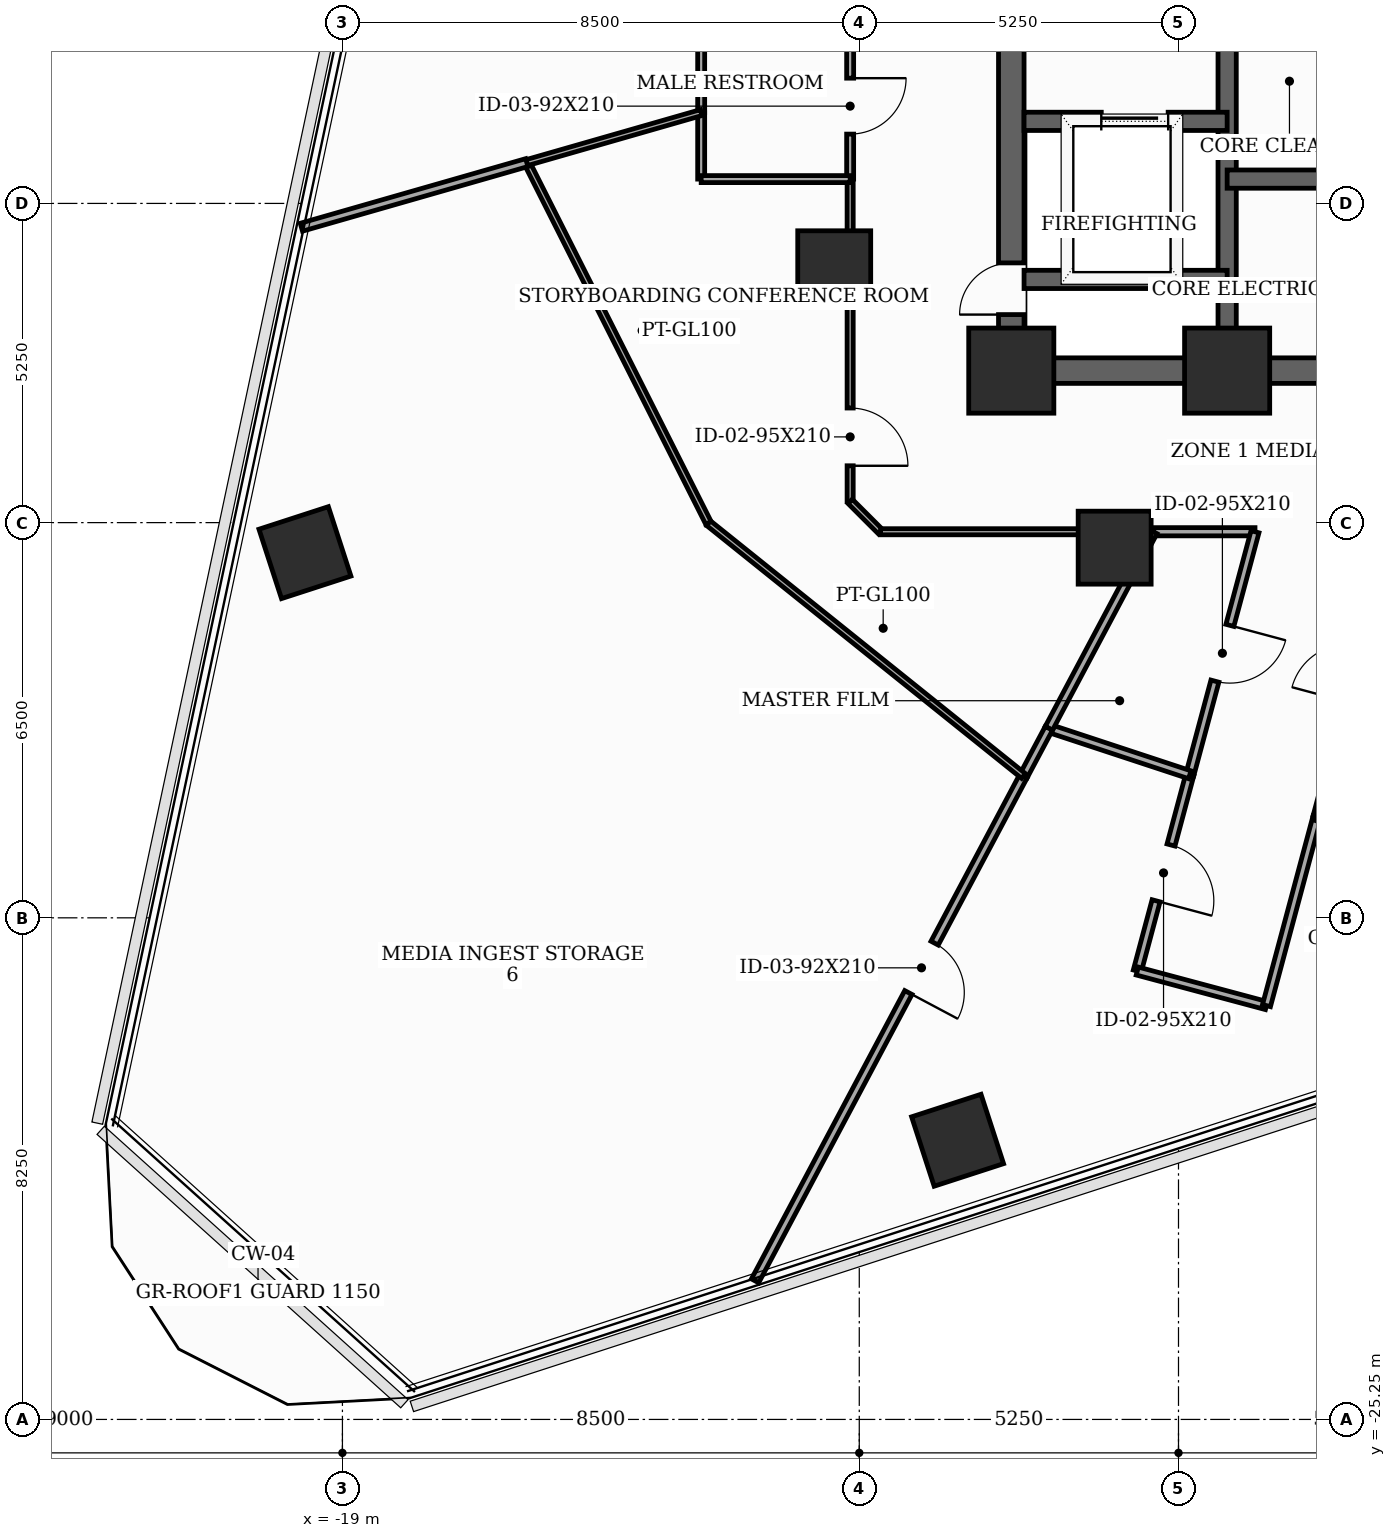
"""IFC4 building model, lengths in metres.
Left out: names, types, materials, properties, quantities, classifications, styles, units other than length and angle.
Written with IfcOpenShell. Run it as: python <this file> out.ifc"""

import sys

from ifc_helpers import new_model, si_unit, direction, frame, frame_2d, origin, origin_2d, place, context, subcontext, project, spatial, rectangle, extrude, element, fill, save


model = new_model("IFC4")
c1 = context("Model", 3, precision=1e-05, world=origin(), true_north=direction((0.0, 1.0)))
c2 = subcontext(c1, "Body", "Model", "MODEL_VIEW")
j1 = project(units=[si_unit("LENGTHUNIT", "METRE"), si_unit("PLANEANGLEUNIT", "RADIAN")], contexts=[c1])
p1 = place(None, origin())
s1 = spatial("IfcSite", under=j1, at=p1, CompositionType="ELEMENT")
p2 = place(p1, origin())
s2 = spatial("IfcBuilding", under=s1, at=p2, CompositionType="ELEMENT")
p3 = place(p2, frame((0.0, 0.0, 90.3)))
s3 = spatial("IfcBuildingStorey", under=s2, at=p3, CompositionType="ELEMENT", Elevation=90.3)
for number, where, z_axis, x_axis in (
    (1, (-8.0, -8.0, 0.0), (0.0, 0.0, 1.0), (1.0, 0.0, 0.0)),
    (2, (-4.45, -8.0, 0.0), (0.0, 0.0, 1.0), (1.0, 0.0, 0.0)),
):
    element("IfcColumn", number, at=place(p3, frame(where, z_axis=z_axis, x_axis=x_axis)), inside=s3, PredefinedType="COLUMN", context=c2, shape_type="SweptSolid", body=[
        extrude(rectangle(XDim=1.4, YDim=1.4, at=origin_2d()), origin(), (0.0, 0.0, 1.0), 3.7),
    ])
for number, where, z_axis, x_axis in (
    (3, (-10.912, -6.3, 0.0), (0.0, 0.0, 1.0), (1.0, 0.0, 0.0)),
    (4, (-6.3, -10.912, 0.0), (0.0, 0.0, 1.0), (1.0, 0.0, 0.0)),
    (5, (-8.883, -20.658, 0.0), (0.0, 0.0, 1.0), (0.951, 0.309, 0.0)),
    (6, (-19.616, -10.994, 0.0), (0.0, 0.0, 1.0), (0.951, 0.309, 0.0)),
):
    element("IfcColumn", number, at=place(p3, frame(where, z_axis=z_axis, x_axis=x_axis)), inside=s3, PredefinedType="COLUMN", context=c2, shape_type="SweptSolid", body=[
        extrude(rectangle(XDim=1.2, YDim=1.2, at=origin_2d()), origin(), (0.0, 0.0, 1.0), 3.7),
    ])
p4 = place(p3, frame((-8.0, -8.0, 0.0), z_axis=(0.0, 0.0, 1.0), x_axis=(0.0, 1.0, 0.0)))
e7 = element("IfcWall", 7, at=p4, inside=s3, PredefinedType="SHEAR", context=c2, shape_type="SweptSolid", body=[
    extrude(rectangle(XDim=16.0, YDim=0.42, at=frame_2d((8.0, 0.0))), origin(), (0.0, 0.0, 1.0), 3.5),
])
p5 = place(p4, frame((0.922, 0.0, 0.0)))
e8 = element("IfcOpeningElement", 8, at=p5, cuts=e7, PredefinedType="OPENING", context=c2, shape_type="SweptSolid", body=[
    extrude(rectangle(XDim=0.85, YDim=2.02, at=frame_2d((0.425, 1.01))), frame((0.0, 0.22, 0.0), z_axis=(0.0, -1.0, 0.0), x_axis=(1.0, 0.0, 0.0)), (0.0, 0.0, 1.0), 0.44),
])
p6 = place(p4, frame((5.35, 0.0, 0.0)))
e9 = element("IfcOpeningElement", 9, at=p6, cuts=e7, PredefinedType="OPENING", context=c2, shape_type="SweptSolid", body=[
    extrude(rectangle(XDim=1.05, YDim=2.15, at=frame_2d((0.525, 1.075))), frame((0.0, 0.22, 0.0), z_axis=(0.0, -1.0, 0.0), x_axis=(1.0, 0.0, 0.0)), (0.0, 0.0, 1.0), 0.44),
])
p7 = place(p3, frame((-8.0, -8.0, 0.0), z_axis=(0.0, 0.0, 1.0), x_axis=(1.0, 0.0, 0.0)))
e10 = element("IfcWall", 10, at=p7, inside=s3, PredefinedType="SHEAR", context=c2, shape_type="SweptSolid", body=[
    extrude(rectangle(XDim=16.0, YDim=0.42, at=frame_2d((8.0, 0.0))), origin(), (0.0, 0.0, 1.0), 3.5),
])
p8 = place(p7, frame((7.52, 0.0, 0.0)))
e11 = element("IfcOpeningElement", 11, at=p8, cuts=e10, PredefinedType="OPENING", context=c2, shape_type="SweptSolid", body=[
    extrude(rectangle(XDim=0.95, YDim=2.1, at=frame_2d((0.475, 1.05))), frame((0.0, 0.22, 0.0), z_axis=(0.0, -1.0, 0.0), x_axis=(1.0, 0.0, 0.0)), (0.0, 0.0, 1.0), 0.44),
])
p9 = place(p3, frame((-4.45, -7.79, 0.0), z_axis=(0.0, 0.0, 1.0), x_axis=(0.0, 1.0, 0.0)))
e12 = element("IfcWall", 12, at=p9, inside=s3, PredefinedType="SHEAR", context=c2, shape_type="SweptSolid", body=[
    extrude(rectangle(XDim=15.58, YDim=0.3, at=frame_2d((7.79, 0.0))), origin(), (0.0, 0.0, 1.0), 3.5),
])
p10 = place(p3, frame((-7.79, -3.9, 0.0), z_axis=(0.0, 0.0, 1.0), x_axis=(1.0, 0.0, 0.0)))
e13 = element("IfcWall", 13, at=p10, inside=s3, PredefinedType="SHEAR", context=c2, shape_type="SweptSolid", body=[
    extrude(rectangle(XDim=3.34, YDim=0.3, at=frame_2d((1.67, 0.0))), origin(), (0.0, 0.0, 1.0), 3.5),
])
p11 = place(p10, frame((1.27, 0.0, 0.0)))
e14 = element("IfcOpeningElement", 14, at=p11, cuts=e13, PredefinedType="OPENING", context=c2, shape_type="SweptSolid", body=[
    extrude(rectangle(XDim=1.1, YDim=2.1, at=frame_2d((0.55, 1.05))), frame((0.0, 0.16, 0.0), z_axis=(0.0, -1.0, 0.0), x_axis=(1.0, 0.0, 0.0)), (0.0, 0.0, 1.0), 0.32),
])
p12 = place(p3, frame((-7.79, -6.5, 0.0), z_axis=(0.0, 0.0, 1.0), x_axis=(1.0, 0.0, 0.0)))
e15 = element("IfcWall", 15, at=p12, inside=s3, PredefinedType="SHEAR", context=c2, shape_type="SweptSolid", body=[
    extrude(rectangle(XDim=3.34, YDim=0.3, at=frame_2d((1.67, 0.0))), origin(), (0.0, 0.0, 1.0), 3.5),
])
p13 = place(p3, frame((-4.45, -4.85, 0.0), z_axis=(0.0, 0.0, 1.0), x_axis=(1.0, 0.0, 0.0)))
e16 = element("IfcWall", 16, at=p13, inside=s3, PredefinedType="SHEAR", context=c2, shape_type="SweptSolid", body=[
    extrude(rectangle(XDim=8.9, YDim=0.3, at=frame_2d((4.45, 0.0))), origin(), (0.0, 0.0, 1.0), 3.5),
])
p14 = place(p3, frame((-5.663, -10.65, 0.0), z_axis=(0.0, 0.0, 1.0), x_axis=(1.0, 0.0, 0.0)))
e17 = element("IfcWall", 17, at=p14, inside=s3, PredefinedType="PARTITIONING", context=c2, shape_type="SweptSolid", body=[
    extrude(rectangle(XDim=1.671, YDim=0.135, at=frame_2d((0.835, 0.0))), origin(), (0.0, 0.0, 1.0), 3.5),
])
p15 = place(p3, frame((-3.992, -10.65, 0.0), z_axis=(0.0, 0.0, 1.0), x_axis=(-0.259046685972, -0.96586480135, 0.0)))
e18 = element("IfcWall", 18, at=p15, inside=s3, PredefinedType="PARTITIONING", context=c2, shape_type="SweptSolid", body=[
    extrude(rectangle(XDim=4.138, YDim=0.135, at=frame_2d((2.069, 0.0))), origin(), (0.0, 0.0, 1.0), 2.785),
])
p16 = place(p15, frame((1.594, 0.0, 0.0)))
e19 = element("IfcOpeningElement", 19, at=p16, cuts=e18, PredefinedType="OPENING", context=c2, shape_type="SweptSolid", body=[
    extrude(rectangle(XDim=0.95, YDim=2.1, at=frame_2d((0.475, 1.05))), frame((0.0, 0.077, 0.0), z_axis=(0.0, -1.0, 0.0), x_axis=(1.0, 0.0, 0.0)), (0.0, 0.0, 1.0), 0.155),
])
p17 = place(p3, frame((-5.064, -14.647, 0.0), z_axis=(0.0, 0.0, 1.0), x_axis=(-0.258558355083, -0.965995640268, 0.0)))
e20 = element("IfcWall", 20, at=p17, inside=s3, PredefinedType="PARTITIONING", context=c2, shape_type="SweptSolid", body=[
    extrude(rectangle(XDim=3.342, YDim=0.135, at=frame_2d((1.671, 0.0))), origin(), (0.0, 0.0, 1.0), 3.125),
])
p18 = place(p17, frame((1.196, 0.0, 0.0)))
e21 = element("IfcOpeningElement", 21, at=p18, cuts=e20, PredefinedType="OPENING", context=c2, shape_type="SweptSolid", body=[
    extrude(rectangle(XDim=0.95, YDim=2.1, at=frame_2d((0.475, 1.05))), frame((0.0, 0.077, 0.0), z_axis=(0.0, -1.0, 0.0), x_axis=(1.0, 0.0, 0.0)), (0.0, 0.0, 1.0), 0.155),
])
p19 = place(p3, frame((-5.928, -17.875, 0.0), z_axis=(0.0, 0.0, 1.0), x_axis=(0.965959937537, -0.258691706618, 0.0)))
e22 = element("IfcWall", 22, at=p19, inside=s3, PredefinedType="PARTITIONING", context=c2, shape_type="SweptSolid", body=[
    extrude(rectangle(XDim=2.2, YDim=0.135, at=frame_2d((1.1, 0.0))), origin(), (0.0, 0.0, 1.0), 3.5),
])
p20 = place(p3, frame((-3.803, -18.444, 0.0), z_axis=(0.0, 0.0, 1.0), x_axis=(0.258739880159, 0.965947034995, 0.0)))
e23 = element("IfcWall", 23, at=p20, inside=s3, PredefinedType="PARTITIONING", context=c2, shape_type="SweptSolid", body=[
    extrude(rectangle(XDim=3.216, YDim=0.135, at=frame_2d((1.608, 0.0))), origin(), (0.0, 0.0, 1.0), 3.125),
])
p21 = place(p3, frame((-2.971, -15.338, 0.0), z_axis=(0.0, 0.0, 1.0), x_axis=(0.258764582319, 0.965940417902, 0.0)))
e24 = element("IfcWall", 24, at=p21, inside=s3, PredefinedType="PARTITIONING", context=c2, shape_type="SweptSolid", body=[
    extrude(rectangle(XDim=4.853, YDim=0.135, at=frame_2d((2.427, 0.0))), origin(), (0.0, 0.0, 1.0), 2.785),
])
p22 = place(p21, frame((1.952, 0.0, 0.0)))
e25 = element("IfcOpeningElement", 25, at=p22, cuts=e24, PredefinedType="OPENING", context=c2, shape_type="SweptSolid", body=[
    extrude(rectangle(XDim=0.95, YDim=2.1, at=frame_2d((0.475, 1.05))), frame((0.0, 0.077, 0.0), z_axis=(0.0, -1.0, 0.0), x_axis=(1.0, 0.0, 0.0)), (0.0, 0.0, 1.0), 0.155),
])
p23 = place(p3, frame((-10.65, -2.45, 0.0), z_axis=(0.0, 0.0, 1.0), x_axis=(0.0, -1.0, 0.0)))
e26 = element("IfcWall", 26, at=p23, inside=s3, PredefinedType="PARTITIONING", context=c2, shape_type="SweptSolid", body=[
    extrude(rectangle(XDim=2.4, YDim=0.115, at=frame_2d((1.2, 0.0))), origin(), (0.0, 0.0, 1.0), 3.5),
])
p24 = place(p23, frame((0.74, 0.0, 0.0)))
e27 = element("IfcOpeningElement", 27, at=p24, cuts=e26, PredefinedType="OPENING", context=c2, shape_type="SweptSolid", body=[
    extrude(rectangle(XDim=0.92, YDim=2.1, at=frame_2d((0.46, 1.05))), frame((0.0, 0.067, 0.0), z_axis=(0.0, -1.0, 0.0), x_axis=(1.0, 0.0, 0.0)), (0.0, 0.0, 1.0), 0.135),
])
p25 = place(p3, frame((-10.65, -4.85, 0.0), z_axis=(0.0, 0.0, 1.0), x_axis=(0.0, -1.0, 0.0)))
e28 = element("IfcWall", 28, at=p25, inside=s3, PredefinedType="MOVABLE", context=c2, shape_type="SweptSolid", body=[
    extrude(rectangle(XDim=5.3, YDim=0.1, at=frame_2d((2.65, 0.0))), origin(), (0.0, 0.0, 1.0), 2.785),
])
p26 = place(p25, frame((3.765, 0.0, 0.0)))
e29 = element("IfcOpeningElement", 29, at=p26, cuts=e28, PredefinedType="OPENING", context=c2, shape_type="SweptSolid", body=[
    extrude(rectangle(XDim=0.95, YDim=2.1, at=frame_2d((0.475, 1.05))), frame((0.0, 0.06, 0.0), z_axis=(0.0, -1.0, 0.0), x_axis=(1.0, 0.0, 0.0)), (0.0, 0.0, 1.0), 0.12),
])
p27 = place(p3, frame((-10.65, -10.15, 0.0), z_axis=(0.0, 0.0, 1.0), x_axis=(0.707106781187, -0.707106781187, 0.0)))
e30 = element("IfcWall", 30, at=p27, inside=s3, PredefinedType="MOVABLE", context=c2, shape_type="SweptSolid", body=[
    extrude(rectangle(XDim=0.707, YDim=0.1, at=frame_2d((0.354, 0.0))), origin(), (0.0, 0.0, 1.0), 3.5),
])
p28 = place(p3, frame((-10.15, -10.65, 0.0), z_axis=(0.0, 0.0, 1.0), x_axis=(1.0, 0.0, 0.0)))
e31 = element("IfcWall", 31, at=p28, inside=s3, PredefinedType="MOVABLE", context=c2, shape_type="SweptSolid", body=[
    extrude(rectangle(XDim=4.487, YDim=0.1, at=frame_2d((2.243, 0.0))), origin(), (0.0, 0.0, 1.0), 2.785),
])
p29 = place(p3, frame((-7.382, -13.883, 0.0), z_axis=(0.0, 0.0, 1.0), x_axis=(0.949758055829, -0.312985040199, 0.0)))
e32 = element("IfcWall", 32, at=p29, inside=s3, PredefinedType="PARTITIONING", context=c2, shape_type="SweptSolid", body=[
    extrude(rectangle(XDim=2.441, YDim=0.135, at=frame_2d((1.22, 0.0))), origin(), (0.0, 0.0, 1.0), 2.785),
])
p30 = place(p3, frame((-5.663, -10.65, 0.0), z_axis=(0.0, 0.0, 1.0), x_axis=(-0.469449315633, -0.882959421521, 0.0)))
e33 = element("IfcWall", 33, at=p30, inside=s3, PredefinedType="PARTITIONING", context=c2, shape_type="SweptSolid", body=[
    extrude(rectangle(XDim=3.662, YDim=0.135, at=frame_2d((1.831, 0.0))), origin(), (0.0, 0.0, 1.0), 2.785),
])
p31 = place(p3, frame((-1.926, -15.682, 0.0), z_axis=(0.0, 0.0, 1.0), x_axis=(-0.949852955326, 0.312696919171, 0.0)))
e34 = element("IfcWall", 34, at=p31, inside=s3, PredefinedType="PARTITIONING", context=c2, shape_type="SweptSolid", body=[
    extrude(rectangle(XDim=1.1, YDim=0.135, at=frame_2d((0.55, 0.0))), origin(), (0.0, 0.0, 1.0), 3.125),
])
p32 = place(p3, frame((-7.382, -13.883, 0.0), z_axis=(0.0, 0.0, 1.0), x_axis=(-0.469617532863, -0.882869963714, 0.0)))
e35 = element("IfcWall", 35, at=p32, inside=s3, PredefinedType="PARTITIONING", context=c2, shape_type="SweptSolid", body=[
    extrude(rectangle(XDim=0.888, YDim=0.135, at=frame_2d((0.444, 0.0))), origin(), (0.0, 0.0, 1.0), 2.785),
])
p33 = place(p3, frame((-7.799, -14.667, 0.0), z_axis=(0.0, 0.0, 1.0), x_axis=(-0.469441180524, -0.882963746723, 0.0)))
e36 = element("IfcWall", 36, at=p33, inside=s3, PredefinedType="PARTITIONING", context=c2, shape_type="SweptSolid", body=[
    extrude(rectangle(XDim=9.404, YDim=0.135, at=frame_2d((4.702, 0.0))), origin(), (0.0, 0.0, 1.0), 2.935),
])
p34 = place(p33, frame((3.114, 0.0, 0.0)))
e37 = element("IfcOpeningElement", 37, at=p34, cuts=e36, PredefinedType="OPENING", context=c2, shape_type="SweptSolid", body=[
    extrude(rectangle(XDim=0.92, YDim=2.1, at=frame_2d((0.46, 1.05))), frame((0.0, 0.077, 0.0), z_axis=(0.0, -1.0, 0.0), x_axis=(1.0, 0.0, 0.0)), (0.0, 0.0, 1.0), 0.155),
])
p35 = place(p3, frame((-13.1, -3.756, 0.0), z_axis=(0.0, 0.0, 1.0), x_axis=(0.0, -1.0, 0.0)))
e38 = element("IfcWall", 38, at=p35, inside=s3, PredefinedType="PARTITIONING", context=c2, shape_type="SweptSolid", body=[
    extrude(rectangle(XDim=1.094, YDim=0.115, at=frame_2d((0.547, 0.0))), origin(), (0.0, 0.0, 1.0), 3.5),
])
p36 = place(p3, frame((-13.1, -4.85, 0.0), z_axis=(0.0, 0.0, 1.0), x_axis=(1.0, 0.0, 0.0)))
e39 = element("IfcWall", 39, at=p36, inside=s3, PredefinedType="PARTITIONING", context=c2, shape_type="SweptSolid", body=[
    extrude(rectangle(XDim=2.45, YDim=0.115, at=frame_2d((1.225, 0.0))), origin(), (0.0, 0.0, 1.0), 2.785),
])
p37 = place(p3, frame((-13.1, -2.45, 0.0), z_axis=(0.0, 0.0, 1.0), x_axis=(0.0, -1.0, 0.0)))
e40 = element("IfcWall", 40, at=p37, inside=s3, PredefinedType="PARTITIONING", context=c2, shape_type="SweptSolid", body=[
    extrude(rectangle(XDim=1.306, YDim=0.115, at=frame_2d((0.653, 0.0))), origin(), (0.0, 0.0, 1.0), 3.5),
])
p38 = place(p3, frame((-15.968, -4.579, 0.0), z_axis=(0.0, 0.0, 1.0), x_axis=(0.450166439867, -0.892944665933, 0.0)))
e41 = element("IfcWall", 41, at=p38, inside=s3, PredefinedType="MOVABLE", context=c2, shape_type="SweptSolid", body=[
    extrude(rectangle(XDim=6.642, YDim=0.1, at=frame_2d((3.321, 0.0))), origin(), (0.0, 0.0, 1.0), 2.785),
])
p39 = place(p3, frame((-12.978, -10.51, 0.0), z_axis=(0.0, 0.0, 1.0), x_axis=(0.779852762203, -0.625962993543, 0.0)))
e42 = element("IfcWall", 42, at=p39, inside=s3, PredefinedType="MOVABLE", context=c2, shape_type="SweptSolid", body=[
    extrude(rectangle(XDim=6.641, YDim=0.1, at=frame_2d((3.32, 0.0))), origin(), (0.0, 0.0, 1.0), 3.5),
])
p40 = place(p3, frame((-13.1, -3.756, 0.0), z_axis=(0.0, 0.0, 1.0), x_axis=(-0.961205264208, -0.275834080671, 0.0)))
e43 = element("IfcWall", 43, at=p40, inside=s3, PredefinedType="MOVABLE", context=c2, shape_type="SweptSolid", body=[
    extrude(rectangle(XDim=2.984, YDim=0.1, at=frame_2d((1.492, 0.0))), origin(), (0.0, 0.0, 1.0), 3.125),
])
p41 = place(p3, frame((-15.968, -4.579, 0.0), z_axis=(0.0, 0.0, 1.0), x_axis=(-0.961294264275, -0.275523751194, 0.0)))
e44 = element("IfcWall", 44, at=p41, inside=s3, PredefinedType="PARTITIONING", context=c2, shape_type="SweptSolid", body=[
    extrude(rectangle(XDim=3.856, YDim=0.135, at=frame_2d((1.928, 0.0))), origin(), (0.0, 0.0, 1.0), 2.935),
])
p42 = place(p5, origin())
e45 = element("IfcDoor", 45, at=p42, inside=s3, OperationType="SINGLE_SWING_LEFT", PredefinedType="TRAPDOOR", context=c2, shape_type="SweptSolid", body=[
    extrude(rectangle(XDim=0.85, YDim=2.02, at=frame_2d((0.425, 1.01))), frame((0.0, 0.025, 0.0), z_axis=(0.0, -1.0, 0.0), x_axis=(1.0, 0.0, 0.0)), (0.0, 0.0, 1.0), 0.05),
])
fill(e8, e45)
p43 = place(p11, origin())
e46 = element("IfcDoor", 46, at=p43, inside=s3, OperationType="SLIDING_TO_LEFT", PredefinedType="DOOR", context=c2, shape_type="SweptSolid", body=[
    extrude(rectangle(XDim=1.1, YDim=2.1, at=frame_2d((0.55, 1.05))), frame((0.0, 0.025, 0.0), z_axis=(0.0, -1.0, 0.0), x_axis=(1.0, 0.0, 0.0)), (0.0, 0.0, 1.0), 0.05),
])
fill(e14, e46)
p44 = place(p16, origin())
e47 = element("IfcDoor", 47, at=p44, inside=s3, OperationType="SINGLE_SWING_LEFT", PredefinedType="DOOR", context=c2, shape_type="SweptSolid", body=[
    extrude(rectangle(XDim=0.95, YDim=2.1, at=frame_2d((0.475, 1.05))), frame((0.0, 0.025, 0.0), z_axis=(0.0, -1.0, 0.0), x_axis=(1.0, 0.0, 0.0)), (0.0, 0.0, 1.0), 0.05),
])
fill(e19, e47)
p45 = place(p18, origin())
e48 = element("IfcDoor", 48, at=p45, inside=s3, OperationType="SINGLE_SWING_RIGHT", PredefinedType="DOOR", context=c2, shape_type="SweptSolid", body=[
    extrude(rectangle(XDim=0.95, YDim=2.1, at=frame_2d((0.475, 1.05))), frame((0.0, 0.025, 0.0), z_axis=(0.0, -1.0, 0.0), x_axis=(1.0, 0.0, 0.0)), (0.0, 0.0, 1.0), 0.05),
])
fill(e21, e48)
p46 = place(p24, origin())
e49 = element("IfcDoor", 49, at=p46, inside=s3, OperationType="SINGLE_SWING_LEFT", PredefinedType="DOOR", context=c2, shape_type="SweptSolid", body=[
    extrude(rectangle(XDim=0.92, YDim=2.1, at=frame_2d((0.46, 1.05))), frame((0.0, 0.025, 0.0), z_axis=(0.0, -1.0, 0.0), x_axis=(1.0, 0.0, 0.0)), (0.0, 0.0, 1.0), 0.05),
])
fill(e27, e49)
p47 = place(p26, origin())
e50 = element("IfcDoor", 50, at=p47, inside=s3, OperationType="SINGLE_SWING_RIGHT", PredefinedType="DOOR", context=c2, shape_type="SweptSolid", body=[
    extrude(rectangle(XDim=0.95, YDim=2.1, at=frame_2d((0.475, 1.05))), frame((0.0, 0.025, 0.0), z_axis=(0.0, -1.0, 0.0), x_axis=(1.0, 0.0, 0.0)), (0.0, 0.0, 1.0), 0.05),
])
fill(e29, e50)
p48 = place(p34, origin())
e51 = element("IfcDoor", 51, at=p48, inside=s3, OperationType="SINGLE_SWING_RIGHT", PredefinedType="DOOR", context=c2, shape_type="SweptSolid", body=[
    extrude(rectangle(XDim=0.92, YDim=2.1, at=frame_2d((0.46, 1.05))), frame((0.0, 0.025, 0.0), z_axis=(0.0, -1.0, 0.0), x_axis=(1.0, 0.0, 0.0)), (0.0, 0.0, 1.0), 0.05),
])
fill(e37, e51)
save(model, sys.argv[1])
